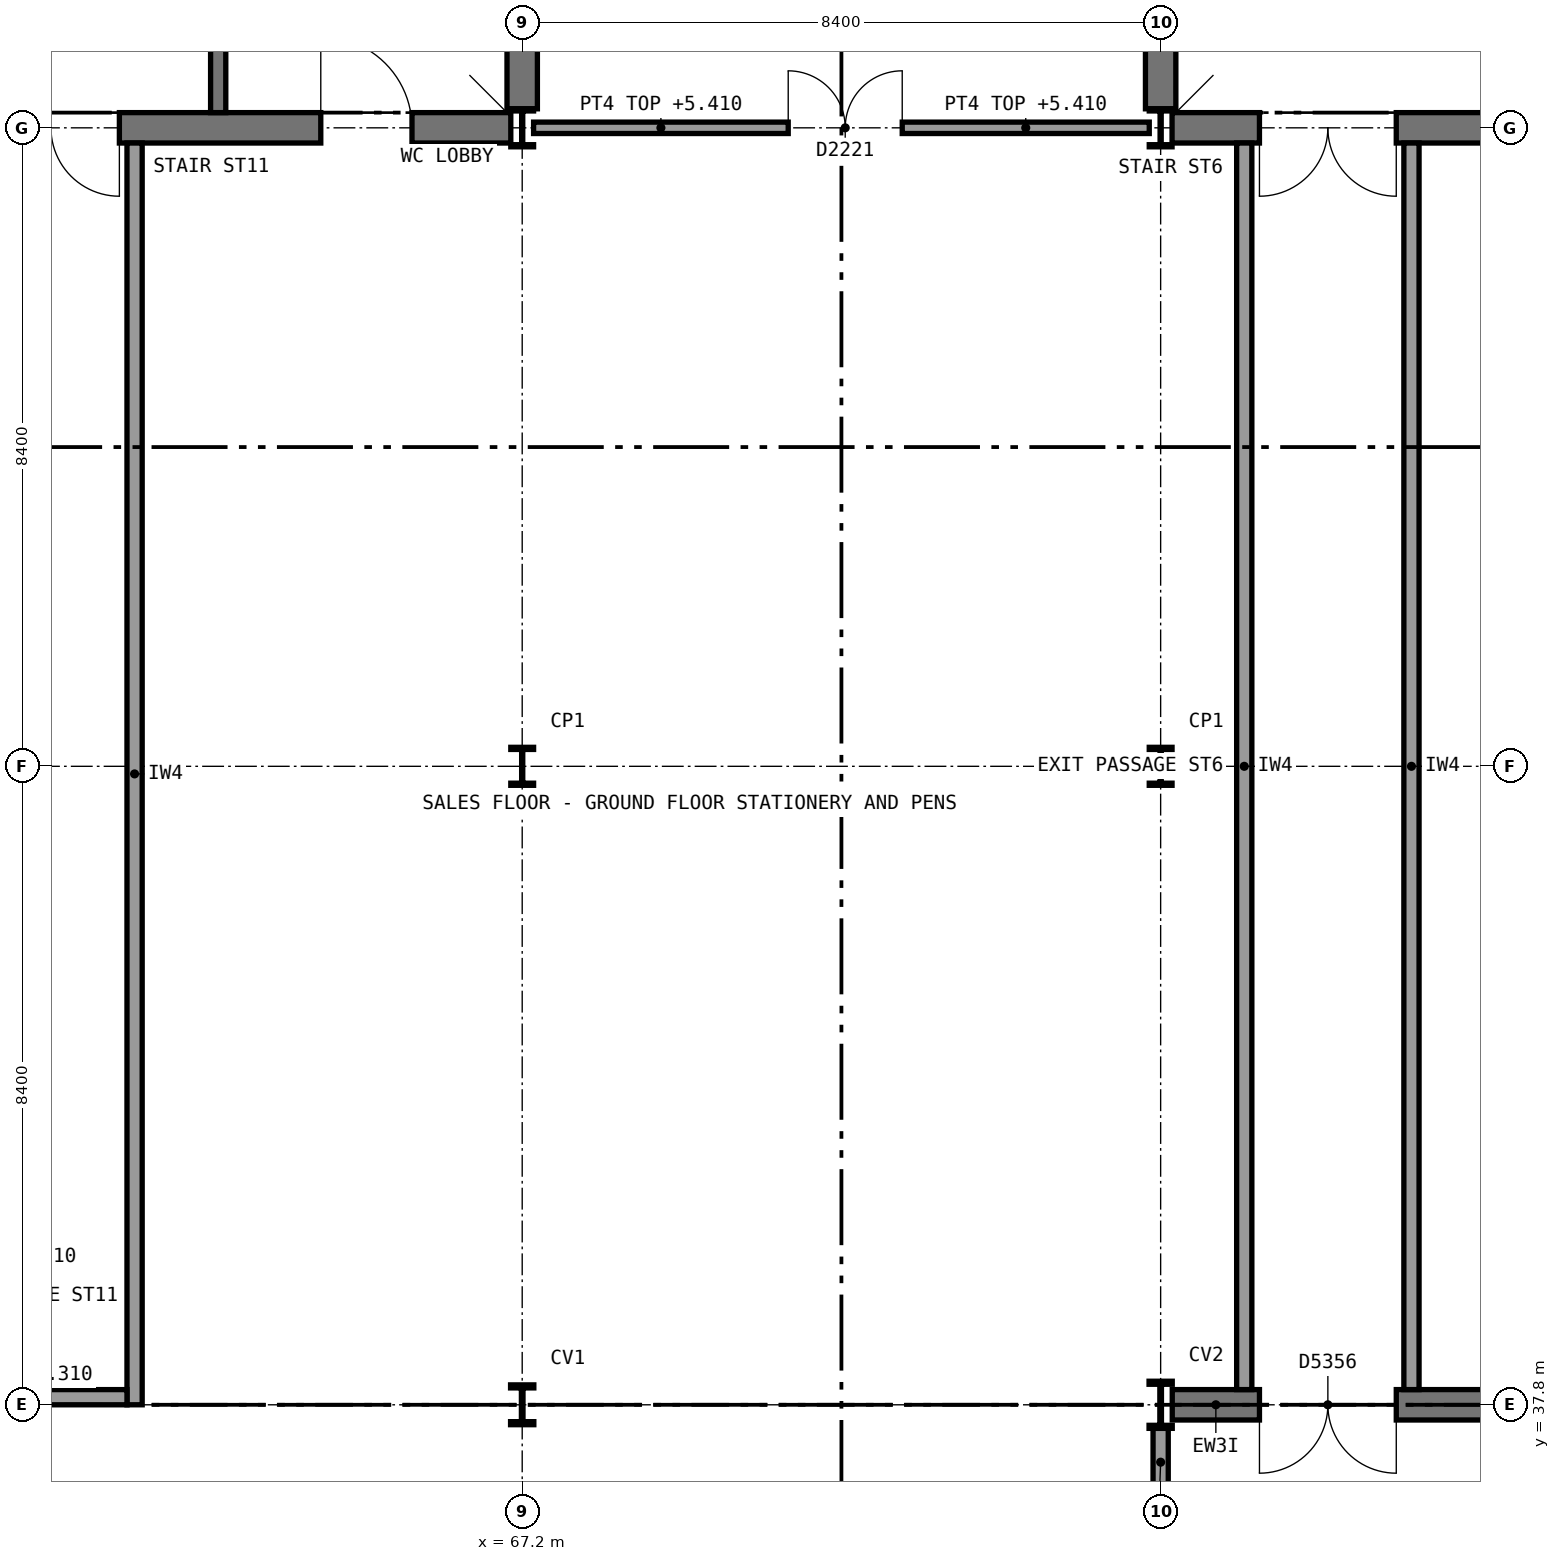
"""IFC4 building model, lengths in metres.
Left out: names, types, materials, properties, quantities, classifications, styles, units other than length and angle.
Written with IfcOpenShell. Run it as: python <this file> out.ifc"""

import sys

from ifc_helpers import new_model, si_unit, direction, frame, frame_2d, origin, origin_2d, place, context, subcontext, project, spatial, rectangle, i_section, extrude, element, fill, save


model = new_model("IFC4")
c1 = context("Model", 3, precision=1e-05, world=origin(), true_north=direction((0.0, 1.0)))
c2 = subcontext(c1, "Body", "Model", "MODEL_VIEW")
j1 = project(units=[si_unit("LENGTHUNIT", "METRE"), si_unit("PLANEANGLEUNIT", "RADIAN")], contexts=[c1])
p1 = place(None, origin())
s1 = spatial("IfcSite", under=j1, at=p1, CompositionType="ELEMENT")
p2 = place(p1, origin())
s2 = spatial("IfcBuilding", under=s1, at=p2, CompositionType="ELEMENT")
p3 = place(p2, origin())
s3 = spatial("IfcBuildingStorey", under=s2, at=p3, CompositionType="ELEMENT", Elevation=0.0)
p4 = place(p3, frame((75.75, 54.6, 0.0), z_axis=(0.0, 0.0, 1.0), x_axis=(1.0, 0.0, 0.0)))
e1 = element("IfcWall", 1, at=p4, inside=s3, PredefinedType="SHEAR", context=c2, shape_type="SweptSolid", body=[
    extrude(rectangle(XDim=8.097, YDim=0.4, at=frame_2d((4.048, 0.0))), origin(), (0.0, 0.0, 1.0), 5.85),
])
p5 = place(p4, frame((5.3, 0.0, 0.0)))
e2 = element("IfcOpeningElement", 2, at=p5, cuts=e1, PredefinedType="OPENING", context=c2, shape_type="SweptSolid", body=[
    extrude(rectangle(XDim=1.8, YDim=2.1, at=frame_2d((0.9, 1.05))), frame((0.0, 0.21, 0.0), z_axis=(0.0, -1.0, 0.0), x_axis=(1.0, 0.0, 0.0)), (0.0, 0.0, 1.0), 0.42),
])
p6 = place(p4, frame((1.15, 0.0, 0.0)))
e3 = element("IfcOpeningElement", 3, at=p6, cuts=e1, PredefinedType="OPENING", context=c2, shape_type="SweptSolid", body=[
    extrude(rectangle(XDim=1.8, YDim=2.1, at=frame_2d((0.9, 1.05))), frame((0.0, 0.21, 0.0), z_axis=(0.0, -1.0, 0.0), x_axis=(1.0, 0.0, 0.0)), (0.0, 0.0, 1.0), 0.42),
])
p7 = place(p3, frame((75.6, 54.85, 0.0), z_axis=(0.0, 0.0, 1.0), x_axis=(0.0, 1.0, 0.0)))
e4 = element("IfcWall", 4, at=p7, inside=s3, PredefinedType="SHEAR", context=c2, shape_type="SweptSolid", body=[
    extrude(rectangle(XDim=7.9, YDim=0.4, at=frame_2d((3.95, 0.0))), origin(), (0.0, 0.0, 1.0), 5.85),
])
p8 = place(p3, frame((58.95, 54.6, 0.0), z_axis=(0.0, 0.0, 1.0), x_axis=(1.0, 0.0, 0.0)))
e5 = element("IfcWall", 5, at=p8, inside=s3, PredefinedType="SHEAR", context=c2, shape_type="SweptSolid", body=[
    extrude(rectangle(XDim=8.1, YDim=0.4, at=frame_2d((4.05, 0.0))), origin(), (0.0, 0.0, 1.0), 5.85),
])
p9 = place(p8, frame((5.6, 0.0, 0.0)))
e6 = element("IfcOpeningElement", 6, at=p9, cuts=e5, PredefinedType="OPENING", context=c2, shape_type="SweptSolid", body=[
    extrude(rectangle(XDim=1.2, YDim=2.1, at=frame_2d((0.6, 1.05))), frame((0.0, 0.21, 0.0), z_axis=(0.0, -1.0, 0.0), x_axis=(1.0, 0.0, 0.0)), (0.0, 0.0, 1.0), 0.42),
])
p10 = place(p8, frame((1.15, 0.0, 0.0)))
e7 = element("IfcOpeningElement", 7, at=p10, cuts=e5, PredefinedType="OPENING", context=c2, shape_type="SweptSolid", body=[
    extrude(rectangle(XDim=1.8, YDim=2.1, at=frame_2d((0.9, 1.05))), frame((0.0, 0.21, 0.0), z_axis=(0.0, -1.0, 0.0), x_axis=(1.0, 0.0, 0.0)), (0.0, 0.0, 1.0), 0.42),
])
p11 = place(p3, frame((67.2, 54.85, 0.0), z_axis=(0.0, 0.0, 1.0), x_axis=(0.0, 1.0, 0.0)))
e8 = element("IfcWall", 8, at=p11, inside=s3, PredefinedType="SHEAR", context=c2, shape_type="SweptSolid", body=[
    extrude(rectangle(XDim=7.9, YDim=0.4, at=frame_2d((3.95, 0.0))), origin(), (0.0, 0.0, 1.0), 5.85),
])
p12 = place(p3, frame((67.2, 37.8, 0.0), z_axis=(0.0, 0.0, 1.0), x_axis=(1.0, 0.0, 0.0)))
e9 = element("IfcColumn", 9, at=p12, inside=s3, PredefinedType="COLUMN", context=c2, shape_type="SweptSolid", body=[
    extrude(i_section(OverallWidth=0.306, OverallDepth=0.524, WebThickness=0.021, FlangeThickness=0.04, FilletRadius=0.027, at=origin_2d()), origin(), (0.0, 0.0, 1.0), 6.0),
])
for number, where, z_axis, x_axis in (
    (10, (67.2, 46.2, 0.0), (0.0, 0.0, 1.0), (1.0, 0.0, 0.0)),
    (11, (67.2, 54.6, 0.0), (0.0, 0.0, 1.0), (1.0, 0.0, 0.0)),
):
    element("IfcColumn", number, at=place(p3, frame(where, z_axis=z_axis, x_axis=x_axis)), inside=s3, PredefinedType="COLUMN", context=c2, shape_type="SweptSolid", body=[
        extrude(i_section(OverallWidth=0.3, OverallDepth=0.5, WebThickness=0.014, FlangeThickness=0.028, FilletRadius=0.027, at=origin_2d()), origin(), (0.0, 0.0, 1.0), 6.0),
    ])
p13 = place(p3, frame((75.6, 37.8, 0.0), z_axis=(0.0, 0.0, 1.0), x_axis=(1.0, 0.0, 0.0)))
e12 = element("IfcColumn", 12, at=p13, inside=s3, PredefinedType="COLUMN", context=c2, shape_type="SweptSolid", body=[
    extrude(i_section(OverallWidth=0.305, OverallDepth=0.62, WebThickness=0.021, FlangeThickness=0.04, FilletRadius=0.027, at=origin_2d()), origin(), (0.0, 0.0, 1.0), 6.0),
])
for number, where, z_axis, x_axis in (
    (13, (75.6, 46.2, 0.0), (0.0, 0.0, 1.0), (1.0, 0.0, 0.0)),
    (14, (75.6, 54.6, 0.0), (0.0, 0.0, 1.0), (1.0, 0.0, 0.0)),
):
    element("IfcColumn", number, at=place(p3, frame(where, z_axis=z_axis, x_axis=x_axis)), inside=s3, PredefinedType="COLUMN", context=c2, shape_type="SweptSolid", body=[
        extrude(i_section(OverallWidth=0.3, OverallDepth=0.5, WebThickness=0.014, FlangeThickness=0.028, FilletRadius=0.027, at=origin_2d()), origin(), (0.0, 0.0, 1.0), 6.0),
    ])
p14 = place(p3, frame((67.35, 54.6, 0.0), z_axis=(0.0, 0.0, 1.0), x_axis=(1.0, 0.0, 0.0)))
e15 = element("IfcWall", 15, at=p14, inside=s3, PredefinedType="SOLIDWALL", context=c2, shape_type="SweptSolid", body=[
    extrude(rectangle(XDim=8.1, YDim=0.15, at=frame_2d((4.05, 0.0))), origin(), (0.0, 0.0, 1.0), 5.41),
])
p15 = place(p14, frame((3.35, 0.0, 0.0)))
e16 = element("IfcOpeningElement", 16, at=p15, cuts=e15, PredefinedType="OPENING", context=c2, shape_type="SweptSolid", body=[
    extrude(rectangle(XDim=1.5, YDim=2.1, at=frame_2d((0.75, 1.05))), frame((0.0, 0.085, 0.0), z_axis=(0.0, -1.0, 0.0), x_axis=(1.0, 0.0, 0.0)), (0.0, 0.0, 1.0), 0.17),
])
p16 = place(p3, frame((75.6, 25.51, 0.0), z_axis=(0.0, 0.0, 1.0), x_axis=(0.0, 1.0, 0.0)))
e17 = element("IfcWall", 17, at=p16, inside=s3, PredefinedType="STANDARD", context=c2, shape_type="SweptSolid", body=[
    extrude(rectangle(XDim=11.98, YDim=0.2, at=frame_2d((5.99, 0.0))), origin(), (0.0, 0.0, 1.0), 5.16),
])
p17 = place(p16, frame((0.89, 0.0, 0.0)))
e18 = element("IfcOpeningElement", 18, at=p17, cuts=e17, PredefinedType="OPENING", context=c2, shape_type="SweptSolid", body=[
    extrude(rectangle(XDim=1.8, YDim=3.0, at=frame_2d((0.9, 1.5))), frame((0.0, 0.11, 0.0), z_axis=(0.0, -1.0, 0.0), x_axis=(1.0, 0.0, 0.0)), (0.0, 0.0, 1.0), 0.22),
])
p18 = place(p16, frame((5.09, 0.0, 0.0)))
e19 = element("IfcOpeningElement", 19, at=p18, cuts=e17, PredefinedType="OPENING", context=c2, shape_type="SweptSolid", body=[
    extrude(rectangle(XDim=1.8, YDim=3.0, at=frame_2d((0.9, 1.5))), frame((0.0, 0.11, 0.0), z_axis=(0.0, -1.0, 0.0), x_axis=(1.0, 0.0, 0.0)), (0.0, 0.0, 1.0), 0.22),
])
p19 = place(p16, frame((9.29, 0.0, 0.0)))
e20 = element("IfcOpeningElement", 20, at=p19, cuts=e17, PredefinedType="OPENING", context=c2, shape_type="SweptSolid", body=[
    extrude(rectangle(XDim=1.8, YDim=3.0, at=frame_2d((0.9, 1.5))), frame((0.0, 0.11, 0.0), z_axis=(0.0, -1.0, 0.0), x_axis=(1.0, 0.0, 0.0)), (0.0, 0.0, 1.0), 0.22),
])
p20 = place(p3, frame((75.753, 37.8, 0.0), z_axis=(0.0, 0.0, 1.0), x_axis=(1.0, 0.0, 0.0)))
e21 = element("IfcWall", 21, at=p20, inside=s3, PredefinedType="STANDARD", context=c2, shape_type="SweptSolid", body=[
    extrude(rectangle(XDim=8.094, YDim=0.4, at=frame_2d((4.047, 0.0))), origin(), (0.0, 0.0, 1.0), 5.85),
])
p21 = place(p20, frame((1.147, 0.0, 0.0)))
e22 = element("IfcOpeningElement", 22, at=p21, cuts=e21, PredefinedType="OPENING", context=c2, shape_type="SweptSolid", body=[
    extrude(rectangle(XDim=1.8, YDim=2.1, at=frame_2d((0.9, 1.05))), frame((0.0, 0.21, 0.0), z_axis=(0.0, -1.0, 0.0), x_axis=(1.0, 0.0, 0.0)), (0.0, 0.0, 1.0), 0.42),
])
p22 = place(p3, frame((63.2, 62.8, 0.0), z_axis=(0.0, 0.0, 1.0), x_axis=(0.0, -1.0, 0.0)))
e23 = element("IfcWall", 23, at=p22, inside=s3, PredefinedType="SHEAR", context=c2, shape_type="SweptSolid", body=[
    extrude(rectangle(XDim=8.0, YDim=0.2, at=frame_2d((4.0, 0.0))), origin(), (0.0, 0.0, 1.0), 5.85),
])
for number, where, z_axis, x_axis in (
    (24, (76.7, 54.4, 0.0), (0.0, 0.0, 1.0), (0.0, -1.0, 0.0)),
    (25, (78.9, 54.4, 0.0), (0.0, 0.0, 1.0), (0.0, -1.0, 0.0)),
):
    element("IfcWall", number, at=place(p3, frame(where, z_axis=z_axis, x_axis=x_axis)), inside=s3, PredefinedType="PARTITIONING", context=c2, shape_type="SweptSolid", body=[
        extrude(rectangle(XDim=16.4, YDim=0.2, at=frame_2d((8.2, 0.0))), origin(), (0.0, 0.0, 1.0), 5.85),
    ])
p23 = place(p3, frame((62.1, 54.4, 0.0), z_axis=(0.0, 0.0, 1.0), x_axis=(0.0, -1.0, 0.0)))
e26 = element("IfcWall", 26, at=p23, inside=s3, PredefinedType="PARTITIONING", context=c2, shape_type="SweptSolid", body=[
    extrude(rectangle(XDim=16.6, YDim=0.2, at=frame_2d((8.3, 0.0))), origin(), (0.0, 0.0, 1.0), 5.85),
])
p24 = place(p3, frame((58.953, 37.9, 0.0), z_axis=(0.0, 0.0, 1.0), x_axis=(1.0, 0.0, 0.0)))
e27 = element("IfcWall", 27, at=p24, inside=s3, PredefinedType="PARTITIONING", context=c2, shape_type="SweptSolid", body=[
    extrude(rectangle(XDim=3.047, YDim=0.2, at=frame_2d((1.523, 0.0))), origin(), (0.0, 0.0, 1.0), 5.31),
])
p25 = place(p15, origin())
e28 = element("IfcDoor", 28, at=p25, inside=s3, OperationType="DOUBLE_DOOR_SINGLE_SWING", PredefinedType="DOOR", context=c2, shape_type="SweptSolid", body=[
    extrude(rectangle(XDim=1.5, YDim=2.1, at=frame_2d((0.75, 1.05))), frame((0.0, 0.025, 0.0), z_axis=(0.0, -1.0, 0.0), x_axis=(1.0, 0.0, 0.0)), (0.0, 0.0, 1.0), 0.05),
])
fill(e16, e28)
p26 = place(p9, origin())
e29 = element("IfcDoor", 29, at=p26, inside=s3, OperationType="SINGLE_SWING_LEFT", PredefinedType="DOOR", context=c2, shape_type="SweptSolid", body=[
    extrude(rectangle(XDim=1.2, YDim=2.1, at=frame_2d((0.6, 1.05))), frame((0.0, 0.025, 0.0), z_axis=(0.0, -1.0, 0.0), x_axis=(1.0, 0.0, 0.0)), (0.0, 0.0, 1.0), 0.05),
])
fill(e6, e29)
p27 = place(p6, frame((1.8, 0.0, 0.0), z_axis=(0.0, 0.0, 1.0), x_axis=(-1.0, 0.0, 0.0)))
e30 = element("IfcDoor", 30, at=p27, inside=s3, OperationType="DOUBLE_DOOR_SINGLE_SWING", PredefinedType="DOOR", context=c2, shape_type="SweptSolid", body=[
    extrude(rectangle(XDim=1.8, YDim=2.1, at=frame_2d((0.9, 1.05))), frame((0.0, 0.025, 0.0), z_axis=(0.0, -1.0, 0.0), x_axis=(1.0, 0.0, 0.0)), (0.0, 0.0, 1.0), 0.05),
])
fill(e3, e30)
p28 = place(p10, frame((1.8, 0.0, 0.0), z_axis=(0.0, 0.0, 1.0), x_axis=(-1.0, 0.0, 0.0)))
e31 = element("IfcDoor", 31, at=p28, inside=s3, OperationType="DOUBLE_DOOR_SINGLE_SWING", PredefinedType="DOOR", context=c2, shape_type="SweptSolid", body=[
    extrude(rectangle(XDim=1.8, YDim=2.1, at=frame_2d((0.9, 1.05))), frame((0.0, 0.025, 0.0), z_axis=(0.0, -1.0, 0.0), x_axis=(1.0, 0.0, 0.0)), (0.0, 0.0, 1.0), 0.05),
])
fill(e7, e31)
p29 = place(p21, frame((1.8, 0.0, 0.0), z_axis=(0.0, 0.0, 1.0), x_axis=(-1.0, 0.0, 0.0)))
e32 = element("IfcDoor", 32, at=p29, inside=s3, OperationType="DOUBLE_DOOR_SINGLE_SWING", PredefinedType="DOOR", context=c2, shape_type="SweptSolid", body=[
    extrude(rectangle(XDim=1.8, YDim=2.1, at=frame_2d((0.9, 1.05))), frame((0.0, 0.025, 0.0), z_axis=(0.0, -1.0, 0.0), x_axis=(1.0, 0.0, 0.0)), (0.0, 0.0, 1.0), 0.05),
])
fill(e22, e32)
save(model, sys.argv[1])
